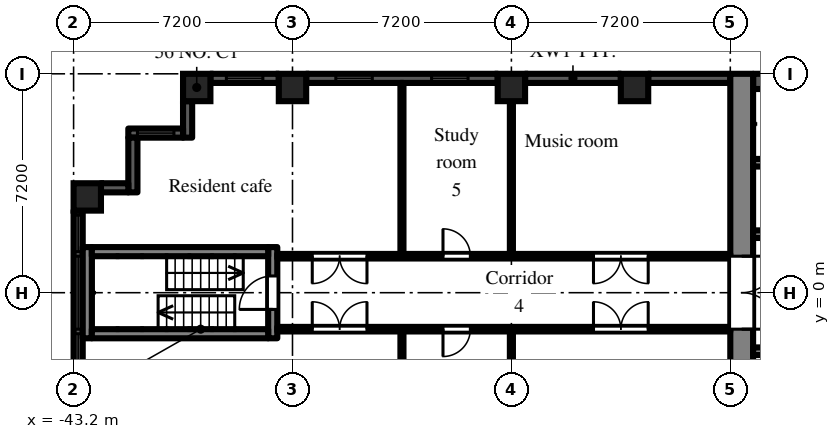
"""IFC4 building model, lengths in metres.
Left out: names, types, materials, properties, quantities, classifications, styles, units other than length and angle.
Written with IfcOpenShell. Run it as: python <this file> out.ifc"""

import sys

from ifc_helpers import new_model, si_unit, direction, frame, frame_2d, origin, origin_2d, place, context, subcontext, project, spatial, rectangle, extrude, element, fill, save


model = new_model("IFC4")
c1 = context("Model", 3, precision=1e-05, world=origin(), true_north=direction((0.0, 1.0)))
c2 = subcontext(c1, "Body", "Model", "MODEL_VIEW")
j1 = project(units=[si_unit("LENGTHUNIT", "METRE"), si_unit("PLANEANGLEUNIT", "RADIAN")], contexts=[c1])
p1 = place(None, origin())
s1 = spatial("IfcSite", under=j1, at=p1, CompositionType="ELEMENT")
p2 = place(p1, origin())
s2 = spatial("IfcBuilding", under=s1, at=p2, CompositionType="ELEMENT")
p3 = place(p2, frame((0.0, 0.0, 29.7)))
s3 = spatial("IfcBuildingStorey", under=s2, at=p3, CompositionType="ELEMENT", Elevation=29.7)
for number, where, z_axis, x_axis in (
    (1, (-42.75, 3.15, 0.0), (0.0, 0.0, 1.0), (1.0, 0.0, 0.0)),
    (2, (-39.15, 6.75, 0.0), (0.0, 0.0, 1.0), (1.0, 0.0, 0.0)),
    (3, (-36.0, 6.75, 0.0), (0.0, 0.0, 1.0), (1.0, 0.0, 0.0)),
    (4, (-28.8, 6.75, 0.0), (0.0, 0.0, 1.0), (1.0, 0.0, 0.0)),
    (5, (-24.75, 6.75, 0.0), (0.0, 0.0, 1.0), (1.0, 0.0, 0.0)),
):
    element("IfcColumn", number, at=place(p3, frame(where, z_axis=z_axis, x_axis=x_axis)), inside=s3, PredefinedType="COLUMN", context=c2, shape_type="SweptSolid", body=[
        extrude(rectangle(XDim=0.9, YDim=0.9, at=origin_2d()), origin(), (0.0, 0.0, 1.0), 3.0),
    ])
p4 = place(p3, frame((-21.6, 7.05, 0.0), z_axis=(0.0, 0.0, 1.0), x_axis=(-1.0, 0.0, 0.0)))
e6 = element("IfcWall", 6, at=p4, inside=s3, PredefinedType="SOLIDWALL", context=c2, shape_type="SweptSolid", body=[
    extrude(rectangle(XDim=2.7, YDim=0.3, at=frame_2d((1.35, 0.0))), origin(), (0.0, 0.0, 1.0), 2.1),
])
p5 = place(p3, frame((-25.2, 7.05, 0.0), z_axis=(0.0, 0.0, 1.0), x_axis=(-1.0, 0.0, 0.0)))
e7 = element("IfcWall", 7, at=p5, inside=s3, PredefinedType="SOLIDWALL", context=c2, shape_type="SweptSolid", body=[
    extrude(rectangle(XDim=3.15, YDim=0.3, at=frame_2d((1.575, 0.0))), origin(), (0.0, 0.0, 1.0), 2.1),
])
p6 = place(p3, frame((-29.25, 7.05, 0.0), z_axis=(0.0, 0.0, 1.0), x_axis=(-1.0, 0.0, 0.0)))
e8 = element("IfcWall", 8, at=p6, inside=s3, PredefinedType="SOLIDWALL", context=c2, shape_type="SweptSolid", body=[
    extrude(rectangle(XDim=6.3, YDim=0.3, at=frame_2d((3.15, 0.0))), origin(), (0.0, 0.0, 1.0), 2.1),
])
p7 = place(p6, frame((0.975, 0.0, 0.2)))
e9 = element("IfcOpeningElement", 9, at=p7, cuts=e8, PredefinedType="OPENING", context=c2, shape_type="SweptSolid", body=[
    extrude(rectangle(XDim=1.2, YDim=1.85, at=frame_2d((0.6, 0.925))), frame((0.0, 0.16, 0.0), z_axis=(0.0, -1.0, 0.0), x_axis=(1.0, 0.0, 0.0)), (0.0, 0.0, 1.0), 0.32),
])
p8 = place(p6, frame((4.125, 0.0, 0.2)))
e10 = element("IfcOpeningElement", 10, at=p8, cuts=e8, PredefinedType="OPENING", context=c2, shape_type="SweptSolid", body=[
    extrude(rectangle(XDim=1.2, YDim=1.85, at=frame_2d((0.6, 0.925))), frame((0.0, 0.16, 0.0), z_axis=(0.0, -1.0, 0.0), x_axis=(1.0, 0.0, 0.0)), (0.0, 0.0, 1.0), 0.32),
])
p9 = place(p3, frame((-36.45, 7.05, 0.0), z_axis=(0.0, 0.0, 1.0), x_axis=(-1.0, 0.0, 0.0)))
e11 = element("IfcWall", 11, at=p9, inside=s3, PredefinedType="SOLIDWALL", context=c2, shape_type="SweptSolid", body=[
    extrude(rectangle(XDim=2.25, YDim=0.3, at=frame_2d((1.125, 0.0))), origin(), (0.0, 0.0, 1.0), 2.1),
])
p10 = place(p9, frame((0.525, 0.0, 0.2)))
e12 = element("IfcOpeningElement", 12, at=p10, cuts=e11, PredefinedType="OPENING", context=c2, shape_type="SweptSolid", body=[
    extrude(rectangle(XDim=1.2, YDim=1.85, at=frame_2d((0.6, 0.925))), frame((0.0, 0.16, 0.0), z_axis=(0.0, -1.0, 0.0), x_axis=(1.0, 0.0, 0.0)), (0.0, 0.0, 1.0), 0.32),
])
p11 = place(p3, frame((-39.45, 6.3, 0.0), z_axis=(0.0, 0.0, 1.0), x_axis=(0.0, -1.0, 0.0)))
e13 = element("IfcWall", 13, at=p11, inside=s3, PredefinedType="SOLIDWALL", context=c2, shape_type="SweptSolid", body=[
    extrude(rectangle(XDim=1.2, YDim=0.3, at=frame_2d((0.6, 0.0))), origin(), (0.0, 0.0, 1.0), 2.575),
])
p12 = place(p3, frame((-39.6, 5.25, 0.0), z_axis=(0.0, 0.0, 1.0), x_axis=(-1.0, 0.0, 0.0)))
e14 = element("IfcWall", 14, at=p12, inside=s3, PredefinedType="SOLIDWALL", context=c2, shape_type="SweptSolid", body=[
    extrude(rectangle(XDim=1.8, YDim=0.3, at=frame_2d((0.9, 0.0))), origin(), (0.0, 0.0, 1.0), 2.575),
])
p13 = place(p12, frame((0.3, 0.0, 0.2)))
e15 = element("IfcOpeningElement", 15, at=p13, cuts=e14, PredefinedType="OPENING", context=c2, shape_type="SweptSolid", body=[
    extrude(rectangle(XDim=1.2, YDim=1.85, at=frame_2d((0.6, 0.925))), frame((0.0, 0.16, 0.0), z_axis=(0.0, -1.0, 0.0), x_axis=(1.0, 0.0, 0.0)), (0.0, 0.0, 1.0), 0.32),
])
p14 = place(p3, frame((-41.25, 5.1, 0.0), z_axis=(0.0, 0.0, 1.0), x_axis=(0.0, -1.0, 0.0)))
e16 = element("IfcWall", 16, at=p14, inside=s3, PredefinedType="SOLIDWALL", context=c2, shape_type="SweptSolid", body=[
    extrude(rectangle(XDim=1.8, YDim=0.3, at=frame_2d((0.9, 0.0))), origin(), (0.0, 0.0, 1.0), 2.575),
])
p15 = place(p3, frame((-41.4, 3.45, 0.0), z_axis=(0.0, 0.0, 1.0), x_axis=(-1.0, 0.0, 0.0)))
e17 = element("IfcWall", 17, at=p15, inside=s3, PredefinedType="SOLIDWALL", context=c2, shape_type="SweptSolid", body=[
    extrude(rectangle(XDim=0.9, YDim=0.3, at=frame_2d((0.45, 0.0))), origin(), (0.0, 0.0, 1.0), 2.575),
])
p16 = place(p3, frame((-43.05, 2.7, 0.0), z_axis=(0.0, 0.0, 1.0), x_axis=(0.0, -1.0, 0.0)))
e18 = element("IfcWall", 18, at=p16, inside=s3, PredefinedType="SOLIDWALL", context=c2, shape_type="SweptSolid", body=[
    extrude(rectangle(XDim=5.4, YDim=0.3, at=frame_2d((2.7, 0.0))), origin(), (0.0, 0.0, 1.0), 2.1),
])
p17 = place(p16, frame((1.5, 0.0, 0.2)))
e19 = element("IfcOpeningElement", 19, at=p17, cuts=e18, PredefinedType="OPENING", context=c2, shape_type="SweptSolid", body=[
    extrude(rectangle(XDim=2.4, YDim=1.85, at=frame_2d((1.2, 0.925))), frame((0.0, 0.16, 0.0), z_axis=(0.0, -1.0, 0.0), x_axis=(1.0, 0.0, 0.0)), (0.0, 0.0, 1.0), 0.32),
])
p18 = place(p16, frame((0.15, 0.0, 0.2)))
e20 = element("IfcOpeningElement", 20, at=p18, cuts=e18, PredefinedType="OPENING", context=c2, shape_type="SweptSolid", body=[
    extrude(rectangle(XDim=1.2, YDim=1.85, at=frame_2d((0.6, 0.925))), frame((0.0, 0.16, 0.0), z_axis=(0.0, -1.0, 0.0), x_axis=(1.0, 0.0, 0.0)), (0.0, 0.0, 1.0), 0.32),
])
p19 = place(p16, frame((4.05, 0.0, 0.2)))
e21 = element("IfcOpeningElement", 21, at=p19, cuts=e18, PredefinedType="OPENING", context=c2, shape_type="SweptSolid", body=[
    extrude(rectangle(XDim=1.2, YDim=1.85, at=frame_2d((0.6, 0.925))), frame((0.0, 0.16, 0.0), z_axis=(0.0, -1.0, 0.0), x_axis=(1.0, 0.0, 0.0)), (0.0, 0.0, 1.0), 0.32),
])
p20 = place(p3, frame((-21.225, -7.2, 0.0), z_axis=(0.0, 0.0, 1.0), x_axis=(0.0, 1.0, 0.0)))
e22 = element("IfcWall", 22, at=p20, inside=s3, PredefinedType="SHEAR", context=c2, shape_type="SweptSolid", body=[
    extrude(rectangle(XDim=14.4, YDim=0.75, at=frame_2d((7.2, 0.0))), origin(), (0.0, 0.0, 1.0), 2.575),
])
p21 = place(p20, frame((6.0, 0.0, 0.0)))
e23 = element("IfcOpeningElement", 23, at=p21, cuts=e22, PredefinedType="OPENING", context=c2, shape_type="SweptSolid", body=[
    extrude(rectangle(XDim=2.4, YDim=2.2, at=frame_2d((1.2, 1.1))), frame((0.0, 0.385, 0.0), z_axis=(0.0, -1.0, 0.0), x_axis=(1.0, 0.0, 0.0)), (0.0, 0.0, 1.0), 0.77),
])
p22 = place(p3, frame((-7.9, 6.95, 0.0), z_axis=(0.0, 0.0, 1.0), x_axis=(-1.0, 0.0, 0.0)))
e24 = element("IfcWall", 24, at=p22, inside=s3, PredefinedType="SHEAR", context=c2, shape_type="SweptSolid", body=[
    extrude(rectangle(XDim=12.95, YDim=0.5, at=frame_2d((6.475, 0.0))), origin(), (0.0, 0.0, 1.0), 2.575),
])
p23 = place(p3, frame((-7.9, 1.925, 0.0), z_axis=(0.0, 0.0, 1.0), x_axis=(-1.0, 0.0, 0.0)))
e25 = element("IfcWall", 25, at=p23, inside=s3, PredefinedType="SHEAR", context=c2, shape_type="SweptSolid", body=[
    extrude(rectangle(XDim=12.95, YDim=0.25, at=frame_2d((6.475, 0.0))), origin(), (0.0, 0.0, 1.0), 2.575),
])
p24 = place(p23, frame((0.525, 0.0, 0.0)))
e26 = element("IfcOpeningElement", 26, at=p24, cuts=e25, PredefinedType="OPENING", context=c2, shape_type="SweptSolid", body=[
    extrude(rectangle(XDim=0.9, YDim=2.1, at=frame_2d((0.45, 1.05))), frame((0.0, 0.135, 0.0), z_axis=(0.0, -1.0, 0.0), x_axis=(1.0, 0.0, 0.0)), (0.0, 0.0, 1.0), 0.27),
])
p25 = place(p23, frame((2.625, 0.0, 0.0)))
e27 = element("IfcOpeningElement", 27, at=p25, cuts=e25, PredefinedType="OPENING", context=c2, shape_type="SweptSolid", body=[
    extrude(rectangle(XDim=1.1, YDim=2.1, at=frame_2d((0.55, 1.05))), frame((0.0, 0.135, 0.0), z_axis=(0.0, -1.0, 0.0), x_axis=(1.0, 0.0, 0.0)), (0.0, 0.0, 1.0), 0.27),
])
p26 = place(p23, frame((6.025, 0.0, 0.0)))
e28 = element("IfcOpeningElement", 28, at=p26, cuts=e25, PredefinedType="OPENING", context=c2, shape_type="SweptSolid", body=[
    extrude(rectangle(XDim=0.9, YDim=2.1, at=frame_2d((0.45, 1.05))), frame((0.0, 0.135, 0.0), z_axis=(0.0, -1.0, 0.0), x_axis=(1.0, 0.0, 0.0)), (0.0, 0.0, 1.0), 0.27),
])
p27 = place(p23, frame((9.325, 0.0, 0.0)))
e29 = element("IfcOpeningElement", 29, at=p27, cuts=e25, PredefinedType="OPENING", context=c2, shape_type="SweptSolid", body=[
    extrude(rectangle(XDim=0.9, YDim=2.1, at=frame_2d((0.45, 1.05))), frame((0.0, 0.135, 0.0), z_axis=(0.0, -1.0, 0.0), x_axis=(1.0, 0.0, 0.0)), (0.0, 0.0, 1.0), 0.27),
])
p28 = place(p3, frame((-12.3, 4.275, 0.0), z_axis=(0.0, 0.0, 1.0), x_axis=(-1.0, 0.0, 0.0)))
e30 = element("IfcWall", 30, at=p28, inside=s3, PredefinedType="SHEAR", context=c2, shape_type="SweptSolid", body=[
    extrude(rectangle(XDim=8.55, YDim=0.25, at=frame_2d((4.275, 0.0))), origin(), (0.0, 0.0, 1.0), 2.575),
])
p29 = place(p3, frame((-7.9, -1.925, 0.0), z_axis=(0.0, 0.0, 1.0), x_axis=(-1.0, 0.0, 0.0)))
e31 = element("IfcWall", 31, at=p29, inside=s3, PredefinedType="SHEAR", context=c2, shape_type="SweptSolid", body=[
    extrude(rectangle(XDim=12.95, YDim=0.25, at=frame_2d((6.475, 0.0))), origin(), (0.0, 0.0, 1.0), 2.575),
])
p30 = place(p29, frame((4.825, 0.0, 0.0)))
e32 = element("IfcOpeningElement", 32, at=p30, cuts=e31, PredefinedType="OPENING", context=c2, shape_type="SweptSolid", body=[
    extrude(rectangle(XDim=1.1, YDim=2.1, at=frame_2d((0.55, 1.05))), frame((0.0, 0.135, 0.0), z_axis=(0.0, -1.0, 0.0), x_axis=(1.0, 0.0, 0.0)), (0.0, 0.0, 1.0), 0.27),
])
p31 = place(p29, frame((7.025, 0.0, 0.0)))
e33 = element("IfcOpeningElement", 33, at=p31, cuts=e31, PredefinedType="OPENING", context=c2, shape_type="SweptSolid", body=[
    extrude(rectangle(XDim=1.1, YDim=2.1, at=frame_2d((0.55, 1.05))), frame((0.0, 0.135, 0.0), z_axis=(0.0, -1.0, 0.0), x_axis=(1.0, 0.0, 0.0)), (0.0, 0.0, 1.0), 0.27),
])
p32 = place(p29, frame((9.225, 0.0, 0.0)))
e34 = element("IfcOpeningElement", 34, at=p32, cuts=e31, PredefinedType="OPENING", context=c2, shape_type="SweptSolid", body=[
    extrude(rectangle(XDim=1.1, YDim=2.1, at=frame_2d((0.55, 1.05))), frame((0.0, 0.135, 0.0), z_axis=(0.0, -1.0, 0.0), x_axis=(1.0, 0.0, 0.0)), (0.0, 0.0, 1.0), 0.27),
])
p33 = place(p29, frame((0.525, 0.0, 0.0)))
e35 = element("IfcOpeningElement", 35, at=p33, cuts=e31, PredefinedType="OPENING", context=c2, shape_type="SweptSolid", body=[
    extrude(rectangle(XDim=0.9, YDim=2.1, at=frame_2d((0.45, 1.05))), frame((0.0, 0.135, 0.0), z_axis=(0.0, -1.0, 0.0), x_axis=(1.0, 0.0, 0.0)), (0.0, 0.0, 1.0), 0.27),
])
p34 = place(p29, frame((2.625, 0.0, 0.0)))
e36 = element("IfcOpeningElement", 36, at=p34, cuts=e31, PredefinedType="OPENING", context=c2, shape_type="SweptSolid", body=[
    extrude(rectangle(XDim=1.1, YDim=2.1, at=frame_2d((0.55, 1.05))), frame((0.0, 0.135, 0.0), z_axis=(0.0, -1.0, 0.0), x_axis=(1.0, 0.0, 0.0)), (0.0, 0.0, 1.0), 0.27),
])
p35 = place(p3, frame((-36.65, -1.5, 0.0), z_axis=(0.0, 0.0, 1.0), x_axis=(0.0, 1.0, 0.0)))
e37 = element("IfcWall", 37, at=p35, inside=s3, PredefinedType="SHEAR", context=c2, shape_type="SweptSolid", body=[
    extrude(rectangle(XDim=3.0, YDim=0.3, at=frame_2d((1.5, 0.0))), origin(), (0.0, 0.0, 1.0), 2.575),
])
p36 = place(p35, frame((0.95, 0.0, 0.0)))
e38 = element("IfcOpeningElement", 38, at=p36, cuts=e37, PredefinedType="OPENING", context=c2, shape_type="SweptSolid", body=[
    extrude(rectangle(XDim=1.1, YDim=2.1, at=frame_2d((0.55, 1.05))), frame((0.0, 0.16, 0.0), z_axis=(0.0, -1.0, 0.0), x_axis=(1.0, 0.0, 0.0)), (0.0, 0.0, 1.0), 0.32),
])
p37 = place(p3, frame((-42.75, -1.5, 0.0), z_axis=(0.0, 0.0, 1.0), x_axis=(0.0, 1.0, 0.0)))
e39 = element("IfcWall", 39, at=p37, inside=s3, PredefinedType="SHEAR", context=c2, shape_type="SweptSolid", body=[
    extrude(rectangle(XDim=3.0, YDim=0.3, at=frame_2d((1.5, 0.0))), origin(), (0.0, 0.0, 1.0), 2.575),
])
for number, where, z_axis, x_axis in (
    (40, (-36.8, -1.35, 0.0), (0.0, 0.0, 1.0), (-1.0, 0.0, 0.0)),
    (41, (-36.8, 1.35, 0.0), (0.0, 0.0, 1.0), (-1.0, 0.0, 0.0)),
):
    element("IfcWall", number, at=place(p3, frame(where, z_axis=z_axis, x_axis=x_axis)), inside=s3, PredefinedType="SHEAR", context=c2, shape_type="SweptSolid", body=[
        extrude(rectangle(XDim=5.8, YDim=0.3, at=frame_2d((2.9, 0.0))), origin(), (0.0, 0.0, 1.0), 2.575),
    ])
p38 = place(p3, frame((-36.5, -1.2, 0.0), z_axis=(0.0, 0.0, 1.0), x_axis=(1.0, 0.0, 0.0)))
e42 = element("IfcWall", 42, at=p38, inside=s3, PredefinedType="PARTITIONING", context=c2, shape_type="SweptSolid", body=[
    extrude(rectangle(XDim=14.9, YDim=0.15, at=frame_2d((7.45, 0.0))), origin(), (0.0, 0.0, 1.0), 2.575),
])
p39 = place(p38, frame((10.4, 0.0, 0.0)))
e43 = element("IfcOpeningElement", 43, at=p39, cuts=e42, PredefinedType="OPENING", context=c2, shape_type="SweptSolid", body=[
    extrude(rectangle(XDim=1.8, YDim=2.1, at=frame_2d((0.9, 1.05))), frame((0.0, 0.085, 0.0), z_axis=(0.0, -1.0, 0.0), x_axis=(1.0, 0.0, 0.0)), (0.0, 0.0, 1.0), 0.17),
])
p40 = place(p38, frame((5.45, 0.0, 0.0)))
e44 = element("IfcOpeningElement", 44, at=p40, cuts=e42, PredefinedType="OPENING", context=c2, shape_type="SweptSolid", body=[
    extrude(rectangle(XDim=0.9, YDim=2.1, at=frame_2d((0.45, 1.05))), frame((0.0, 0.085, 0.0), z_axis=(0.0, -1.0, 0.0), x_axis=(1.0, 0.0, 0.0)), (0.0, 0.0, 1.0), 0.17),
])
p41 = place(p38, frame((1.15, 0.0, 0.0)))
e45 = element("IfcOpeningElement", 45, at=p41, cuts=e42, PredefinedType="OPENING", context=c2, shape_type="SweptSolid", body=[
    extrude(rectangle(XDim=1.8, YDim=2.1, at=frame_2d((0.9, 1.05))), frame((0.0, 0.085, 0.0), z_axis=(0.0, -1.0, 0.0), x_axis=(1.0, 0.0, 0.0)), (0.0, 0.0, 1.0), 0.17),
])
p42 = place(p3, frame((-36.5, 1.2, 0.0), z_axis=(0.0, 0.0, 1.0), x_axis=(1.0, 0.0, 0.0)))
e46 = element("IfcWall", 46, at=p42, inside=s3, PredefinedType="PARTITIONING", context=c2, shape_type="SweptSolid", body=[
    extrude(rectangle(XDim=14.9, YDim=0.15, at=frame_2d((7.45, 0.0))), origin(), (0.0, 0.0, 1.0), 2.575),
])
p43 = place(p42, frame((10.4, 0.0, 0.0)))
e47 = element("IfcOpeningElement", 47, at=p43, cuts=e46, PredefinedType="OPENING", context=c2, shape_type="SweptSolid", body=[
    extrude(rectangle(XDim=1.8, YDim=2.1, at=frame_2d((0.9, 1.05))), frame((0.0, 0.085, 0.0), z_axis=(0.0, -1.0, 0.0), x_axis=(1.0, 0.0, 0.0)), (0.0, 0.0, 1.0), 0.17),
])
p44 = place(p42, frame((5.45, 0.0, 0.0)))
e48 = element("IfcOpeningElement", 48, at=p44, cuts=e46, PredefinedType="OPENING", context=c2, shape_type="SweptSolid", body=[
    extrude(rectangle(XDim=0.9, YDim=2.1, at=frame_2d((0.45, 1.05))), frame((0.0, 0.085, 0.0), z_axis=(0.0, -1.0, 0.0), x_axis=(1.0, 0.0, 0.0)), (0.0, 0.0, 1.0), 0.17),
])
p45 = place(p42, frame((1.15, 0.0, 0.0)))
e49 = element("IfcOpeningElement", 49, at=p45, cuts=e46, PredefinedType="OPENING", context=c2, shape_type="SweptSolid", body=[
    extrude(rectangle(XDim=1.8, YDim=2.1, at=frame_2d((0.9, 1.05))), frame((0.0, 0.085, 0.0), z_axis=(0.0, -1.0, 0.0), x_axis=(1.0, 0.0, 0.0)), (0.0, 0.0, 1.0), 0.17),
])
for number, where, z_axis, x_axis in (
    (50, (-32.4, -6.9, 0.0), (0.0, 0.0, 1.0), (0.0, 1.0, 0.0)),
    (51, (-32.4, 1.275, 0.0), (0.0, 0.0, 1.0), (0.0, 1.0, 0.0)),
    (52, (-28.8, -6.9, 0.0), (0.0, 0.0, 1.0), (0.0, 1.0, 0.0)),
    (53, (-28.8, 1.275, 0.0), (0.0, 0.0, 1.0), (0.0, 1.0, 0.0)),
):
    element("IfcWall", number, at=place(p3, frame(where, z_axis=z_axis, x_axis=x_axis)), inside=s3, PredefinedType="PARTITIONING", context=c2, shape_type="SweptSolid", body=[
        extrude(rectangle(XDim=5.625, YDim=0.1, at=frame_2d((2.812, 0.0))), origin(), (0.0, 0.0, 1.0), 2.575),
    ])
p46 = place(p7, origin())
e54 = element("IfcWindow", 54, at=p46, inside=s3, PartitioningType="SINGLE_PANEL", PredefinedType="WINDOW", context=c2, shape_type="SweptSolid", body=[
    extrude(rectangle(XDim=1.2, YDim=1.85, at=frame_2d((0.6, 0.925))), frame((0.0, 0.03, 0.0), z_axis=(0.0, -1.0, 0.0), x_axis=(1.0, 0.0, 0.0)), (0.0, 0.0, 1.0), 0.06),
])
fill(e9, e54)
p47 = place(p8, origin())
e55 = element("IfcWindow", 55, at=p47, inside=s3, PartitioningType="SINGLE_PANEL", PredefinedType="WINDOW", context=c2, shape_type="SweptSolid", body=[
    extrude(rectangle(XDim=1.2, YDim=1.85, at=frame_2d((0.6, 0.925))), frame((0.0, 0.03, 0.0), z_axis=(0.0, -1.0, 0.0), x_axis=(1.0, 0.0, 0.0)), (0.0, 0.0, 1.0), 0.06),
])
fill(e10, e55)
p48 = place(p10, origin())
e56 = element("IfcWindow", 56, at=p48, inside=s3, PartitioningType="SINGLE_PANEL", PredefinedType="WINDOW", context=c2, shape_type="SweptSolid", body=[
    extrude(rectangle(XDim=1.2, YDim=1.85, at=frame_2d((0.6, 0.925))), frame((0.0, 0.03, 0.0), z_axis=(0.0, -1.0, 0.0), x_axis=(1.0, 0.0, 0.0)), (0.0, 0.0, 1.0), 0.06),
])
fill(e12, e56)
p49 = place(p13, origin())
e57 = element("IfcWindow", 57, at=p49, inside=s3, PartitioningType="SINGLE_PANEL", PredefinedType="WINDOW", context=c2, shape_type="SweptSolid", body=[
    extrude(rectangle(XDim=1.2, YDim=1.85, at=frame_2d((0.6, 0.925))), frame((0.0, 0.03, 0.0), z_axis=(0.0, -1.0, 0.0), x_axis=(1.0, 0.0, 0.0)), (0.0, 0.0, 1.0), 0.06),
])
fill(e15, e57)
p50 = place(p17, origin())
e58 = element("IfcWindow", 58, at=p50, inside=s3, PartitioningType="SINGLE_PANEL", PredefinedType="WINDOW", context=c2, shape_type="SweptSolid", body=[
    extrude(rectangle(XDim=2.4, YDim=1.85, at=frame_2d((1.2, 0.925))), frame((0.0, 0.03, 0.0), z_axis=(0.0, -1.0, 0.0), x_axis=(1.0, 0.0, 0.0)), (0.0, 0.0, 1.0), 0.06),
])
fill(e19, e58)
p51 = place(p18, origin())
e59 = element("IfcWindow", 59, at=p51, inside=s3, PartitioningType="SINGLE_PANEL", PredefinedType="WINDOW", context=c2, shape_type="SweptSolid", body=[
    extrude(rectangle(XDim=1.2, YDim=1.85, at=frame_2d((0.6, 0.925))), frame((0.0, 0.03, 0.0), z_axis=(0.0, -1.0, 0.0), x_axis=(1.0, 0.0, 0.0)), (0.0, 0.0, 1.0), 0.06),
])
fill(e20, e59)
p52 = place(p19, origin())
e60 = element("IfcWindow", 60, at=p52, inside=s3, PartitioningType="SINGLE_PANEL", PredefinedType="WINDOW", context=c2, shape_type="SweptSolid", body=[
    extrude(rectangle(XDim=1.2, YDim=1.85, at=frame_2d((0.6, 0.925))), frame((0.0, 0.03, 0.0), z_axis=(0.0, -1.0, 0.0), x_axis=(1.0, 0.0, 0.0)), (0.0, 0.0, 1.0), 0.06),
])
fill(e21, e60)
p53 = place(p21, frame((2.4, 0.0, 0.0), z_axis=(0.0, 0.0, 1.0), x_axis=(-1.0, 0.0, 0.0)))
e61 = element("IfcDoor", 61, at=p53, inside=s3, OperationType="DOUBLE_DOOR_DOUBLE_SWING", PredefinedType="DOOR", context=c2, shape_type="SweptSolid", body=[
    extrude(rectangle(XDim=2.4, YDim=2.2, at=frame_2d((1.2, 1.1))), frame((0.0, 0.025, 0.0), z_axis=(0.0, -1.0, 0.0), x_axis=(1.0, 0.0, 0.0)), (0.0, 0.0, 1.0), 0.05),
])
fill(e23, e61)
p54 = place(p36, origin())
e62 = element("IfcDoor", 62, at=p54, inside=s3, OperationType="SINGLE_SWING_LEFT", PredefinedType="DOOR", context=c2, shape_type="SweptSolid", body=[
    extrude(rectangle(XDim=1.1, YDim=2.1, at=frame_2d((0.55, 1.05))), frame((0.0, 0.025, 0.0), z_axis=(0.0, -1.0, 0.0), x_axis=(1.0, 0.0, 0.0)), (0.0, 0.0, 1.0), 0.05),
])
fill(e38, e62)
p55 = place(p39, origin())
e63 = element("IfcDoor", 63, at=p55, inside=s3, OperationType="DOUBLE_DOOR_DOUBLE_SWING", PredefinedType="DOOR", context=c2, shape_type="SweptSolid", body=[
    extrude(rectangle(XDim=1.8, YDim=2.1, at=frame_2d((0.9, 1.05))), frame((0.0, 0.025, 0.0), z_axis=(0.0, -1.0, 0.0), x_axis=(1.0, 0.0, 0.0)), (0.0, 0.0, 1.0), 0.05),
])
fill(e43, e63)
p56 = place(p40, frame((0.9, 0.0, 0.0), z_axis=(0.0, 0.0, 1.0), x_axis=(-1.0, 0.0, 0.0)))
e64 = element("IfcDoor", 64, at=p56, inside=s3, OperationType="SINGLE_SWING_RIGHT", PredefinedType="DOOR", context=c2, shape_type="SweptSolid", body=[
    extrude(rectangle(XDim=0.9, YDim=2.1, at=frame_2d((0.45, 1.05))), frame((0.0, 0.025, 0.0), z_axis=(0.0, -1.0, 0.0), x_axis=(1.0, 0.0, 0.0)), (0.0, 0.0, 1.0), 0.05),
])
fill(e44, e64)
p57 = place(p41, origin())
e65 = element("IfcDoor", 65, at=p57, inside=s3, OperationType="DOUBLE_DOOR_DOUBLE_SWING", PredefinedType="DOOR", context=c2, shape_type="SweptSolid", body=[
    extrude(rectangle(XDim=1.8, YDim=2.1, at=frame_2d((0.9, 1.05))), frame((0.0, 0.025, 0.0), z_axis=(0.0, -1.0, 0.0), x_axis=(1.0, 0.0, 0.0)), (0.0, 0.0, 1.0), 0.05),
])
fill(e45, e65)
p58 = place(p43, frame((1.8, 0.0, 0.0), z_axis=(0.0, 0.0, 1.0), x_axis=(-1.0, 0.0, 0.0)))
e66 = element("IfcDoor", 66, at=p58, inside=s3, OperationType="DOUBLE_DOOR_DOUBLE_SWING", PredefinedType="DOOR", context=c2, shape_type="SweptSolid", body=[
    extrude(rectangle(XDim=1.8, YDim=2.1, at=frame_2d((0.9, 1.05))), frame((0.0, 0.025, 0.0), z_axis=(0.0, -1.0, 0.0), x_axis=(1.0, 0.0, 0.0)), (0.0, 0.0, 1.0), 0.05),
])
fill(e47, e66)
p59 = place(p44, origin())
e67 = element("IfcDoor", 67, at=p59, inside=s3, OperationType="SINGLE_SWING_LEFT", PredefinedType="DOOR", context=c2, shape_type="SweptSolid", body=[
    extrude(rectangle(XDim=0.9, YDim=2.1, at=frame_2d((0.45, 1.05))), frame((0.0, 0.025, 0.0), z_axis=(0.0, -1.0, 0.0), x_axis=(1.0, 0.0, 0.0)), (0.0, 0.0, 1.0), 0.05),
])
fill(e48, e67)
p60 = place(p45, frame((1.8, 0.0, 0.0), z_axis=(0.0, 0.0, 1.0), x_axis=(-1.0, 0.0, 0.0)))
e68 = element("IfcDoor", 68, at=p60, inside=s3, OperationType="DOUBLE_DOOR_DOUBLE_SWING", PredefinedType="DOOR", context=c2, shape_type="SweptSolid", body=[
    extrude(rectangle(XDim=1.8, YDim=2.1, at=frame_2d((0.9, 1.05))), frame((0.0, 0.025, 0.0), z_axis=(0.0, -1.0, 0.0), x_axis=(1.0, 0.0, 0.0)), (0.0, 0.0, 1.0), 0.05),
])
fill(e49, e68)
save(model, sys.argv[1])
